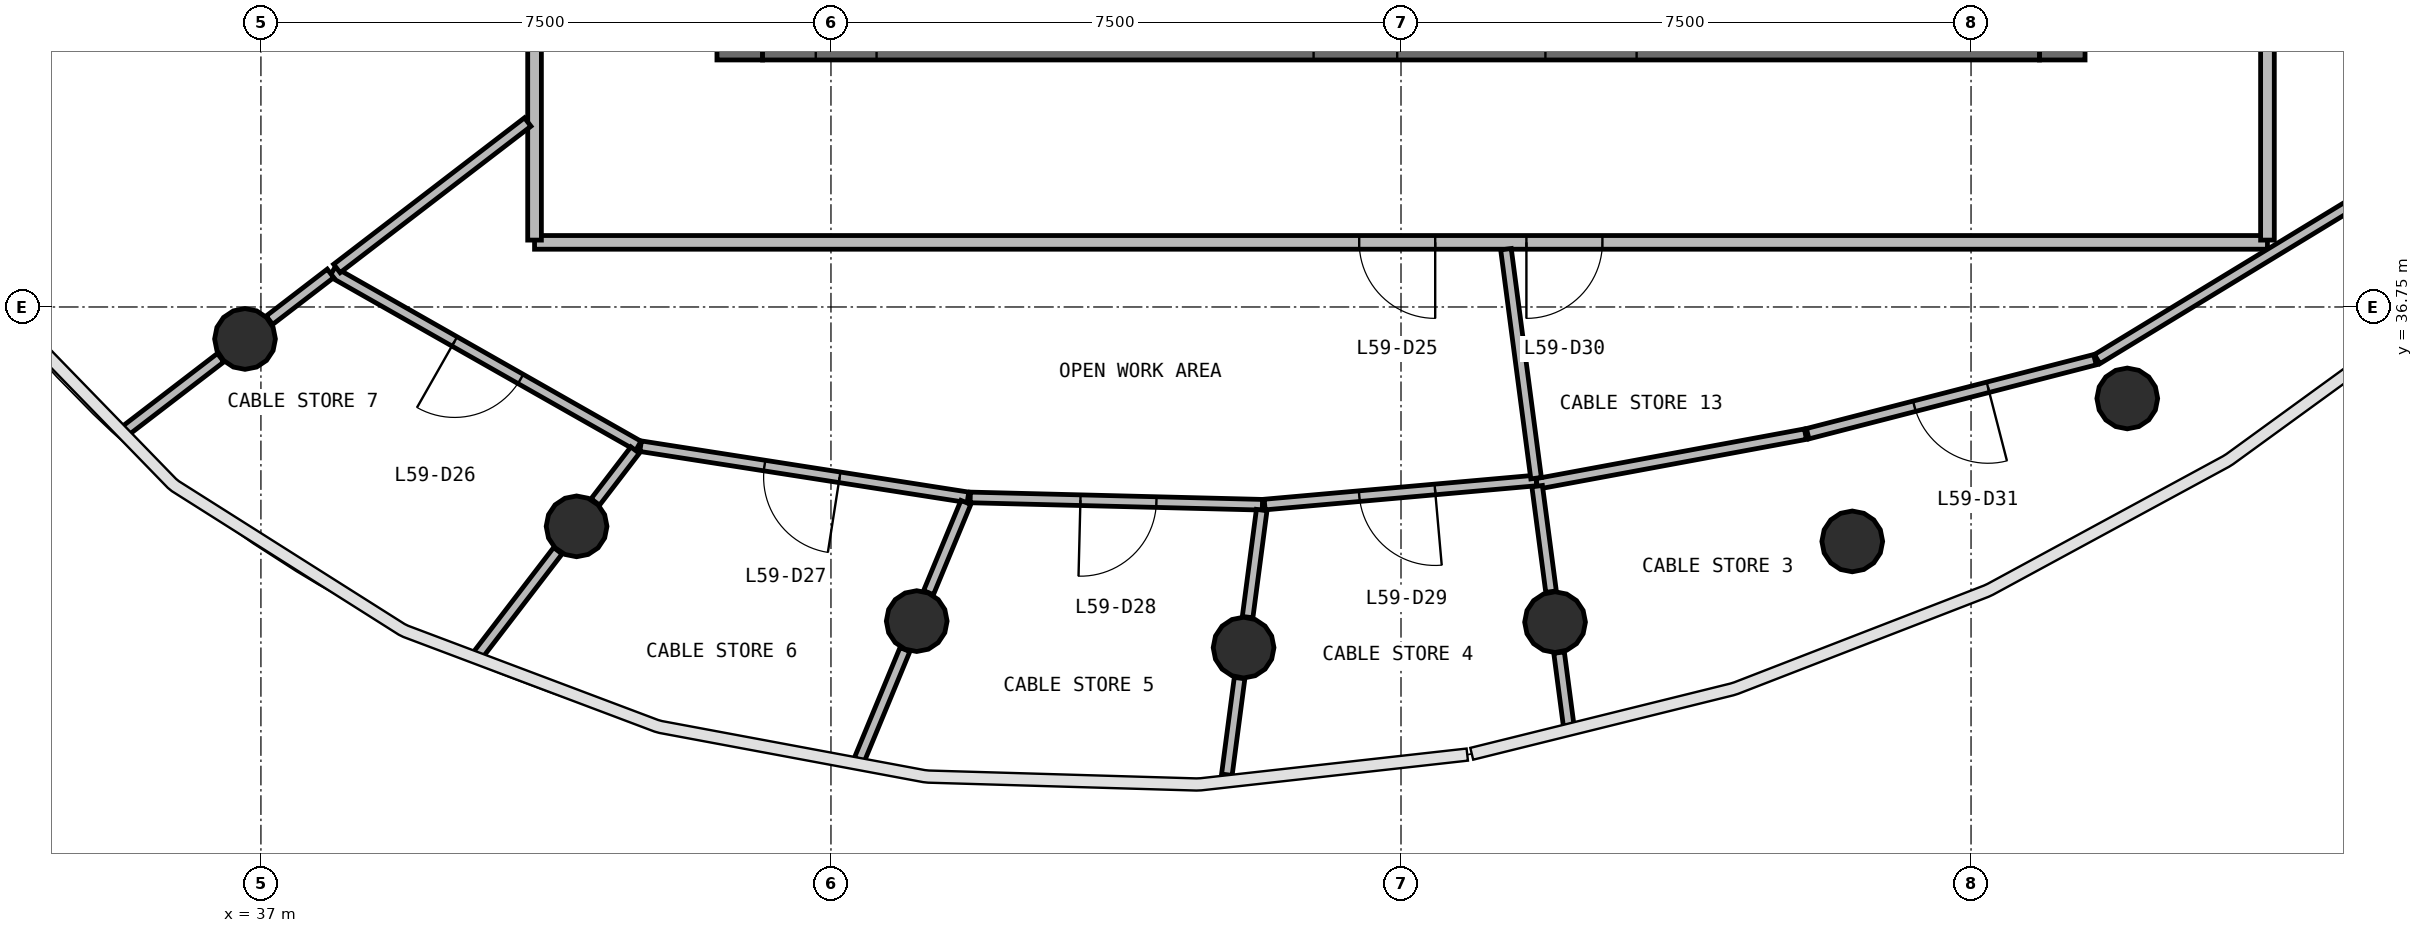
"""IFC4 building model, lengths in metres.
Left out: names, types, materials, properties, quantities, classifications, styles, units other than length and angle.
Written with IfcOpenShell. Run it as: python <this file> out.ifc"""

import sys

from ifc_helpers import new_model, si_unit, direction, frame, frame_2d, origin, origin_2d, place, context, subcontext, project, spatial, rectangle, circle, extrude, source, transform, mapped, element, fill, save


model = new_model("IFC4")
c1 = context("Model", 3, precision=1e-05, world=origin(), true_north=direction((0.0, 1.0)))
c2 = subcontext(c1, "Body", "Model", "MODEL_VIEW")
j1 = project(units=[si_unit("LENGTHUNIT", "METRE"), si_unit("PLANEANGLEUNIT", "RADIAN")], contexts=[c1])
p1 = place(None, origin())
s1 = spatial("IfcSite", under=j1, at=p1, CompositionType="ELEMENT")
p2 = place(p1, origin())
s2 = spatial("IfcBuilding", under=s1, at=p2, CompositionType="ELEMENT")
p3 = place(p2, frame((0.0, 0.0, 242.3)))
s3 = spatial("IfcBuildingStorey", under=s2, at=p3, CompositionType="ELEMENT", Elevation=242.3)
p4 = place(p3, frame((60.7, 40.0, 0.0), z_axis=(0.0, 0.0, 1.0), x_axis=(0.0, 1.0, 0.0)))
e1 = element("IfcWall", 1, at=p4, inside=s3, PredefinedType="SHEAR", context=c2, shape_type="SweptSolid", body=[
    extrude(rectangle(XDim=16.0, YDim=0.6, at=frame_2d((8.0, 0.0))), origin(), (0.0, 0.0, 1.0), 3.9),
])
p5 = place(p4, frame((7.1, 0.0, 0.0)))
e2 = element("IfcOpeningElement", 2, at=p5, cuts=e1, PredefinedType="OPENING", context=c2, shape_type="SweptSolid", body=[
    extrude(rectangle(XDim=1.8, YDim=2.1, at=frame_2d((0.9, 1.05))), frame((0.0, 0.31, 0.0), z_axis=(0.0, -1.0, 0.0), x_axis=(1.0, 0.0, 0.0)), (0.0, 0.0, 1.0), 0.62),
])
p6 = place(p3, frame((43.3, 56.0, 0.0), z_axis=(0.0, 0.0, 1.0), x_axis=(0.0, -1.0, 0.0)))
e3 = element("IfcWall", 3, at=p6, inside=s3, PredefinedType="SHEAR", context=c2, shape_type="SweptSolid", body=[
    extrude(rectangle(XDim=16.0, YDim=0.6, at=frame_2d((8.0, 0.0))), origin(), (0.0, 0.0, 1.0), 3.9),
])
p7 = place(p6, frame((7.1, 0.0, 0.0)))
e4 = element("IfcOpeningElement", 4, at=p7, cuts=e3, PredefinedType="OPENING", context=c2, shape_type="SweptSolid", body=[
    extrude(rectangle(XDim=1.8, YDim=2.1, at=frame_2d((0.9, 1.05))), frame((0.0, 0.31, 0.0), z_axis=(0.0, -1.0, 0.0), x_axis=(1.0, 0.0, 0.0)), (0.0, 0.0, 1.0), 0.62),
])
p8 = place(p3, frame((43.6, 40.3, 0.0), z_axis=(0.0, 0.0, 1.0), x_axis=(1.0, 0.0, 0.0)))
e5 = element("IfcWall", 5, at=p8, inside=s3, PredefinedType="SHEAR", context=c2, shape_type="SweptSolid", body=[
    extrude(rectangle(XDim=16.8, YDim=0.6, at=frame_2d((8.4, 0.0))), origin(), (0.0, 0.0, 1.0), 3.9),
])
p9 = place(p8, frame((10.3, 0.0, 0.0)))
e6 = element("IfcOpeningElement", 6, at=p9, cuts=e5, PredefinedType="OPENING", context=c2, shape_type="SweptSolid", body=[
    extrude(rectangle(XDim=1.2, YDim=2.1, at=frame_2d((0.6, 1.05))), frame((0.0, 0.31, 0.0), z_axis=(0.0, -1.0, 0.0), x_axis=(1.0, 0.0, 0.0)), (0.0, 0.0, 1.0), 0.62),
])
p10 = place(p8, frame((7.25, 0.0, 0.0)))
e7 = element("IfcOpeningElement", 7, at=p10, cuts=e5, PredefinedType="OPENING", context=c2, shape_type="SweptSolid", body=[
    extrude(rectangle(XDim=1.1, YDim=2.1, at=frame_2d((0.55, 1.05))), frame((0.0, 0.31, 0.0), z_axis=(0.0, -1.0, 0.0), x_axis=(1.0, 0.0, 0.0)), (0.0, 0.0, 1.0), 0.62),
])
p11 = place(p8, frame((0.7, 0.0, 0.0)))
e8 = element("IfcOpeningElement", 8, at=p11, cuts=e5, PredefinedType="OPENING", context=c2, shape_type="SweptSolid", body=[
    extrude(rectangle(XDim=0.8, YDim=2.1, at=frame_2d((0.4, 1.05))), frame((0.0, 0.31, 0.0), z_axis=(0.0, -1.0, 0.0), x_axis=(1.0, 0.0, 0.0)), (0.0, 0.0, 1.0), 0.62),
])
m1 = source(origin(), c2, "Body", "SweptSolid", [
    extrude(circle(Radius=0.4, at=origin_2d()), origin(), (0.0, 0.0, 1.0), 3.9),
])
for number, where, z_axis, x_axis in (
    (9, (36.791, 36.329, 0.0), (0.0, 0.0, 1.0), (1.0, 0.0, 0.0)),
    (10, (41.153, 33.864, 0.0), (0.0, 0.0, 1.0), (1.0, 0.0, 0.0)),
    (11, (45.628, 32.617, 0.0), (0.0, 0.0, 1.0), (1.0, 0.0, 0.0)),
    (12, (49.929, 32.269, 0.0), (0.0, 0.0, 1.0), (1.0, 0.0, 0.0)),
    (13, (54.027, 32.604, 0.0), (0.0, 0.0, 1.0), (1.0, 0.0, 0.0)),
    (14, (57.937, 33.666, 0.0), (0.0, 0.0, 1.0), (1.0, 0.0, 0.0)),
    (15, (61.556, 35.547, 0.0), (0.0, 0.0, 1.0), (1.0, 0.0, 0.0)),
):
    element("IfcColumn", number, at=place(p3, frame(where, z_axis=z_axis, x_axis=x_axis)), inside=s3, PredefinedType="COLUMN", context=c2, shape_type="MappedRepresentation", body=[
        mapped(m1, transform((0.0, 0.0, 0.0), scale=1.0)),
    ])
p12 = place(p3, frame((63.4, 37.6, 0.0), z_axis=(0.0, 0.0, 1.0), x_axis=(-1.0, 0.0, 0.0)))
e16 = element("IfcWall", 16, at=p12, inside=s3, PredefinedType="PARTITIONING", context=c2, shape_type="SweptSolid", body=[
    extrude(rectangle(XDim=22.8, YDim=0.18, at=frame_2d((11.4, 0.0))), origin(), (0.0, 0.0, 1.0), 2.88),
])
p13 = place(p12, frame((10.95, 0.0, 0.0)))
e17 = element("IfcOpeningElement", 17, at=p13, cuts=e16, PredefinedType="OPENING", context=c2, shape_type="SweptSolid", body=[
    extrude(rectangle(XDim=1.0, YDim=2.1, at=frame_2d((0.5, 1.05))), frame((0.0, 0.1, 0.0), z_axis=(0.0, -1.0, 0.0), x_axis=(1.0, 0.0, 0.0)), (0.0, 0.0, 1.0), 0.2),
])
p14 = place(p12, frame((8.75, 0.0, 0.0)))
e18 = element("IfcOpeningElement", 18, at=p14, cuts=e16, PredefinedType="OPENING", context=c2, shape_type="SweptSolid", body=[
    extrude(rectangle(XDim=1.0, YDim=2.1, at=frame_2d((0.5, 1.05))), frame((0.0, 0.1, 0.0), z_axis=(0.0, -1.0, 0.0), x_axis=(1.0, 0.0, 0.0)), (0.0, 0.0, 1.0), 0.2),
])
p15 = place(p3, frame((63.4, 58.37, 0.0), z_axis=(0.0, 0.0, 1.0), x_axis=(0.0, -1.0, 0.0)))
e19 = element("IfcWall", 19, at=p15, inside=s3, PredefinedType="PARTITIONING", context=c2, shape_type="SweptSolid", body=[
    extrude(rectangle(XDim=20.74, YDim=0.18, at=frame_2d((10.37, 0.0))), origin(), (0.0, 0.0, 1.0), 2.88),
])
p16 = place(p15, frame((9.89, 0.0, 0.0)))
e20 = element("IfcOpeningElement", 20, at=p16, cuts=e19, PredefinedType="OPENING", context=c2, shape_type="SweptSolid", body=[
    extrude(rectangle(XDim=1.0, YDim=2.1, at=frame_2d((0.5, 1.05))), frame((0.0, 0.1, 0.0), z_axis=(0.0, -1.0, 0.0), x_axis=(1.0, 0.0, 0.0)), (0.0, 0.0, 1.0), 0.2),
])
p17 = place(p15, frame((7.69, 0.0, 0.0)))
e21 = element("IfcOpeningElement", 21, at=p17, cuts=e19, PredefinedType="OPENING", context=c2, shape_type="SweptSolid", body=[
    extrude(rectangle(XDim=1.0, YDim=2.1, at=frame_2d((0.5, 1.05))), frame((0.0, 0.1, 0.0), z_axis=(0.0, -1.0, 0.0), x_axis=(1.0, 0.0, 0.0)), (0.0, 0.0, 1.0), 0.2),
])
p18 = place(p3, frame((40.6, 37.63, 0.0), z_axis=(0.0, 0.0, 1.0), x_axis=(0.0, 1.0, 0.0)))
e22 = element("IfcWall", 22, at=p18, inside=s3, PredefinedType="PARTITIONING", context=c2, shape_type="SweptSolid", body=[
    extrude(rectangle(XDim=20.74, YDim=0.18, at=frame_2d((10.37, 0.0))), origin(), (0.0, 0.0, 1.0), 2.88),
])
p19 = place(p18, frame((9.89, 0.0, 0.0)))
e23 = element("IfcOpeningElement", 23, at=p19, cuts=e22, PredefinedType="OPENING", context=c2, shape_type="SweptSolid", body=[
    extrude(rectangle(XDim=1.0, YDim=2.1, at=frame_2d((0.5, 1.05))), frame((0.0, 0.1, 0.0), z_axis=(0.0, -1.0, 0.0), x_axis=(1.0, 0.0, 0.0)), (0.0, 0.0, 1.0), 0.2),
])
p20 = place(p18, frame((7.69, 0.0, 0.0)))
e24 = element("IfcOpeningElement", 24, at=p20, cuts=e22, PredefinedType="OPENING", context=c2, shape_type="SweptSolid", body=[
    extrude(rectangle(XDim=1.0, YDim=2.1, at=frame_2d((0.5, 1.05))), frame((0.0, 0.1, 0.0), z_axis=(0.0, -1.0, 0.0), x_axis=(1.0, 0.0, 0.0)), (0.0, 0.0, 1.0), 0.2),
])
p21 = place(p3, frame((41.966, 34.923, 0.0), z_axis=(0.0, 0.0, 1.0), x_axis=(-0.869515217262, 0.493906151966, 0.0)))
e25 = element("IfcWall", 25, at=p21, inside=s3, PredefinedType="PARTITIONING", context=c2, shape_type="SweptSolid", body=[
    extrude(rectangle(XDim=4.631, YDim=0.14, at=frame_2d((2.315, 0.0))), origin(), (0.0, 0.0, 1.0), 2.88),
])
p22 = place(p21, frame((1.781, 0.0, 0.0)))
e26 = element("IfcOpeningElement", 26, at=p22, cuts=e25, PredefinedType="OPENING", context=c2, shape_type="SweptSolid", body=[
    extrude(rectangle(XDim=1.0, YDim=2.1, at=frame_2d((0.5, 1.05))), frame((0.0, 0.08, 0.0), z_axis=(0.0, -1.0, 0.0), x_axis=(1.0, 0.0, 0.0)), (0.0, 0.0, 1.0), 0.16),
])
p23 = place(p3, frame((46.302, 34.245, 0.0), z_axis=(0.0, 0.0, 1.0), x_axis=(-0.987998415533, 0.15446401168, 0.0)))
e27 = element("IfcWall", 27, at=p23, inside=s3, PredefinedType="PARTITIONING", context=c2, shape_type="SweptSolid", body=[
    extrude(rectangle(XDim=4.359, YDim=0.14, at=frame_2d((2.18, 0.0))), origin(), (0.0, 0.0, 1.0), 2.88),
])
p24 = place(p23, frame((1.709, 0.0, 0.0)))
e28 = element("IfcOpeningElement", 28, at=p24, cuts=e27, PredefinedType="OPENING", context=c2, shape_type="SweptSolid", body=[
    extrude(rectangle(XDim=1.0, YDim=2.1, at=frame_2d((0.5, 1.05))), frame((0.0, 0.08, 0.0), z_axis=(0.0, -1.0, 0.0), x_axis=(1.0, 0.0, 0.0)), (0.0, 0.0, 1.0), 0.16),
])
p25 = place(p3, frame((61.159, 36.064, 0.0), z_axis=(0.0, 0.0, 1.0), x_axis=(0.854311228383, 0.519761796459, 0.0)))
e29 = element("IfcWall", 29, at=p25, inside=s3, PredefinedType="PARTITIONING", context=c2, shape_type="SweptSolid", body=[
    extrude(rectangle(XDim=3.974, YDim=0.14, at=frame_2d((1.987, 0.0))), origin(), (0.0, 0.0, 1.0), 2.88),
])
p26 = place(p3, frame((61.13, 36.056, 0.0), z_axis=(0.0, 0.0, 1.0), x_axis=(-0.968365634835, -0.249535563137, 0.0)))
e30 = element("IfcWall", 30, at=p26, inside=s3, PredefinedType="PARTITIONING", context=c2, shape_type="SweptSolid", body=[
    extrude(rectangle(XDim=3.903, YDim=0.14, at=frame_2d((1.951, 0.0))), origin(), (0.0, 0.0, 1.0), 2.88),
])
p27 = place(p26, frame((1.453, 0.0, 0.0)))
e31 = element("IfcOpeningElement", 31, at=p27, cuts=e30, PredefinedType="OPENING", context=c2, shape_type="SweptSolid", body=[
    extrude(rectangle(XDim=1.0, YDim=2.1, at=frame_2d((0.5, 1.05))), frame((0.0, 0.08, 0.0), z_axis=(0.0, -1.0, 0.0), x_axis=(1.0, 0.0, 0.0)), (0.0, 0.0, 1.0), 0.16),
])
p28 = place(p3, frame((50.177, 34.148, 0.0), z_axis=(0.0, 0.0, 1.0), x_axis=(-0.999687051256, 0.025015985913, 0.0)))
e32 = element("IfcWall", 32, at=p28, inside=s3, PredefinedType="PARTITIONING", context=c2, shape_type="SweptSolid", body=[
    extrude(rectangle(XDim=3.845, YDim=0.14, at=frame_2d((1.923, 0.0))), origin(), (0.0, 0.0, 1.0), 2.88),
])
p29 = place(p28, frame((1.395, 0.0, 0.0)))
e33 = element("IfcOpeningElement", 33, at=p29, cuts=e32, PredefinedType="OPENING", context=c2, shape_type="SweptSolid", body=[
    extrude(rectangle(XDim=1.0, YDim=2.1, at=frame_2d((0.5, 1.05))), frame((0.0, 0.08, 0.0), z_axis=(0.0, -1.0, 0.0), x_axis=(1.0, 0.0, 0.0)), (0.0, 0.0, 1.0), 0.16),
])
p30 = place(p3, frame((53.788, 34.423, 0.0), z_axis=(0.0, 0.0, 1.0), x_axis=(0.983272092094, 0.182142781656, 0.0)))
e34 = element("IfcWall", 34, at=p30, inside=s3, PredefinedType="PARTITIONING", context=c2, shape_type="SweptSolid", body=[
    extrude(rectangle(XDim=3.594, YDim=0.14, at=frame_2d((1.797, 0.0))), origin(), (0.0, 0.0, 1.0), 2.88),
])
p31 = place(p3, frame((53.779, 34.468, 0.0), z_axis=(0.0, 0.0, 1.0), x_axis=(-0.99609594944, -0.088277174337, 0.0)))
e35 = element("IfcWall", 35, at=p31, inside=s3, PredefinedType="PARTITIONING", context=c2, shape_type="SweptSolid", body=[
    extrude(rectangle(XDim=3.587, YDim=0.14, at=frame_2d((1.793, 0.0))), origin(), (0.0, 0.0, 1.0), 2.88),
])
p32 = place(p31, frame((1.337, 0.0, 0.0)))
e36 = element("IfcOpeningElement", 36, at=p32, cuts=e35, PredefinedType="OPENING", context=c2, shape_type="SweptSolid", body=[
    extrude(rectangle(XDim=1.0, YDim=2.1, at=frame_2d((0.5, 1.05))), frame((0.0, 0.08, 0.0), z_axis=(0.0, -1.0, 0.0), x_axis=(1.0, 0.0, 0.0)), (0.0, 0.0, 1.0), 0.16),
])
p33 = place(p3, frame((40.51, 39.183, 0.0), z_axis=(0.0, 0.0, 1.0), x_axis=(-0.793360447036, -0.608752167207, 0.0)))
e37 = element("IfcWall", 37, at=p33, inside=s3, PredefinedType="PARTITIONING", context=c2, shape_type="SweptSolid", body=[
    extrude(rectangle(XDim=3.165, YDim=0.14, at=frame_2d((1.583, 0.0))), origin(), (0.0, 0.0, 1.0), 2.88),
])
p34 = place(p3, frame((53.381, 37.51, 0.0), z_axis=(0.0, 0.0, 1.0), x_axis=(0.130489847189, -0.99144964561, 0.0)))
e38 = element("IfcWall", 38, at=p34, inside=s3, PredefinedType="PARTITIONING", context=c2, shape_type="SweptSolid", body=[
    extrude(rectangle(XDim=3.038, YDim=0.14, at=frame_2d((1.519, 0.0))), origin(), (0.0, 0.0, 1.0), 2.88),
])
p35 = place(p3, frame((40.907, 33.543, 0.0), z_axis=(0.0, 0.0, 1.0), x_axis=(-0.608647541693, -0.793440716116, 0.0)))
e39 = element("IfcWall", 39, at=p35, inside=s3, PredefinedType="PARTITIONING", context=c2, shape_type="SweptSolid", body=[
    extrude(rectangle(XDim=1.732, YDim=0.14, at=frame_2d((0.866, 0.0))), origin(), (0.0, 0.0, 1.0), 2.88),
])
p36 = place(p3, frame((36.469, 36.083, 0.0), z_axis=(0.0, 0.0, 1.0), x_axis=(-0.793355628453, -0.608758447006, 0.0)))
e40 = element("IfcWall", 40, at=p36, inside=s3, PredefinedType="PARTITIONING", context=c2, shape_type="SweptSolid", body=[
    extrude(rectangle(XDim=1.599, YDim=0.14, at=frame_2d((0.799, 0.0))), origin(), (0.0, 0.0, 1.0), 2.88),
])
p37 = place(p3, frame((45.473, 32.243, 0.0), z_axis=(0.0, 0.0, 1.0), x_axis=(-0.382736533707, -0.923857535427, 0.0)))
e41 = element("IfcWall", 41, at=p37, inside=s3, PredefinedType="PARTITIONING", context=c2, shape_type="SweptSolid", body=[
    extrude(rectangle(XDim=1.569, YDim=0.14, at=frame_2d((0.785, 0.0))), origin(), (0.0, 0.0, 1.0), 2.88),
])
p38 = place(p3, frame((50.167, 34.078, 0.0), z_axis=(0.0, 0.0, 1.0), x_axis=(-0.130610105032, -0.99143381043, 0.0)))
e42 = element("IfcWall", 42, at=p38, inside=s3, PredefinedType="PARTITIONING", context=c2, shape_type="SweptSolid", body=[
    extrude(rectangle(XDim=1.421, YDim=0.14, at=frame_2d((0.71, 0.0))), origin(), (0.0, 0.0, 1.0), 2.88),
])
p39 = place(p3, frame((53.792, 34.393, 0.0), z_axis=(0.0, 0.0, 1.0), x_axis=(0.130450001243, -0.991454889128, 0.0)))
e43 = element("IfcWall", 43, at=p39, inside=s3, PredefinedType="PARTITIONING", context=c2, shape_type="SweptSolid", body=[
    extrude(rectangle(XDim=1.4, YDim=0.14, at=frame_2d((0.7, 0.0))), origin(), (0.0, 0.0, 1.0), 2.88),
])
p40 = place(p3, frame((46.275, 34.179, 0.0), z_axis=(0.0, 0.0, 1.0), x_axis=(-0.382698623129, -0.923873240145, 0.0)))
e44 = element("IfcWall", 44, at=p40, inside=s3, PredefinedType="PARTITIONING", context=c2, shape_type="SweptSolid", body=[
    extrude(rectangle(XDim=1.285, YDim=0.14, at=frame_2d((0.643, 0.0))), origin(), (0.0, 0.0, 1.0), 2.88),
])
p41 = place(p3, frame((49.876, 31.868, 0.0), z_axis=(0.0, 0.0, 1.0), x_axis=(-0.130617047537, -0.991432895809, 0.0)))
e45 = element("IfcWall", 45, at=p41, inside=s3, PredefinedType="PARTITIONING", context=c2, shape_type="SweptSolid", body=[
    extrude(rectangle(XDim=1.282, YDim=0.14, at=frame_2d((0.641, 0.0))), origin(), (0.0, 0.0, 1.0), 2.88),
])
p42 = place(p3, frame((37.915, 37.192, 0.0), z_axis=(0.0, 0.0, 1.0), x_axis=(-0.793358047676, -0.608755294177, 0.0)))
e46 = element("IfcWall", 46, at=p42, inside=s3, PredefinedType="PARTITIONING", context=c2, shape_type="SweptSolid", body=[
    extrude(rectangle(XDim=1.013, YDim=0.14, at=frame_2d((0.506, 0.0))), origin(), (0.0, 0.0, 1.0), 2.88),
])
p43 = place(p3, frame((54.08, 32.203, 0.0), z_axis=(0.0, 0.0, 1.0), x_axis=(0.130657168986, -0.991427609154, 0.0)))
e47 = element("IfcWall", 47, at=p43, inside=s3, PredefinedType="PARTITIONING", context=c2, shape_type="SweptSolid", body=[
    extrude(rectangle(XDim=0.966, YDim=0.14, at=frame_2d((0.483, 0.0))), origin(), (0.0, 0.0, 1.0), 2.88),
])
p44 = place(p3, frame((41.923, 34.867, 0.0), z_axis=(0.0, 0.0, 1.0), x_axis=(-0.608777226721, -0.793341218031, 0.0)))
e48 = element("IfcWall", 48, at=p44, inside=s3, PredefinedType="PARTITIONING", context=c2, shape_type="SweptSolid", body=[
    extrude(rectangle(XDim=0.86, YDim=0.14, at=frame_2d((0.43, 0.0))), origin(), (0.0, 0.0, 1.0), 2.88),
])
m2 = source(origin(), c2, "Body", "SweptSolid", [
    extrude(rectangle(XDim=1.0, YDim=2.1, at=frame_2d((0.5, 1.05))), frame((0.0, 0.025, 0.0), z_axis=(0.0, -1.0, 0.0), x_axis=(1.0, 0.0, 0.0)), (0.0, 0.0, 1.0), 0.05),
])
p45 = place(p13, origin())
e49 = element("IfcDoor", 49, at=p45, inside=s3, OperationType="SINGLE_SWING_LEFT", PredefinedType="DOOR", context=c2, shape_type="MappedRepresentation", body=[
    mapped(m2, transform((0.0, 0.0, 0.0), scale=1.0)),
])
fill(e17, e49)
p46 = place(p22, origin())
e50 = element("IfcDoor", 50, at=p46, inside=s3, OperationType="SINGLE_SWING_RIGHT", PredefinedType="DOOR", context=c2, shape_type="MappedRepresentation", body=[
    mapped(m2, transform((0.0, 0.0, 0.0), scale=1.0)),
])
fill(e26, e50)
p47 = place(p24, origin())
e51 = element("IfcDoor", 51, at=p47, inside=s3, OperationType="SINGLE_SWING_LEFT", PredefinedType="DOOR", context=c2, shape_type="MappedRepresentation", body=[
    mapped(m2, transform((0.0, 0.0, 0.0), scale=1.0)),
])
fill(e28, e51)
p48 = place(p29, origin())
e52 = element("IfcDoor", 52, at=p48, inside=s3, OperationType="SINGLE_SWING_RIGHT", PredefinedType="DOOR", context=c2, shape_type="MappedRepresentation", body=[
    mapped(m2, transform((0.0, 0.0, 0.0), scale=1.0)),
])
fill(e33, e52)
p49 = place(p32, origin())
e53 = element("IfcDoor", 53, at=p49, inside=s3, OperationType="SINGLE_SWING_LEFT", PredefinedType="DOOR", context=c2, shape_type="MappedRepresentation", body=[
    mapped(m2, transform((0.0, 0.0, 0.0), scale=1.0)),
])
fill(e36, e53)
p50 = place(p14, origin())
e54 = element("IfcDoor", 54, at=p50, inside=s3, OperationType="SINGLE_SWING_RIGHT", PredefinedType="DOOR", context=c2, shape_type="MappedRepresentation", body=[
    mapped(m2, transform((0.0, 0.0, 0.0), scale=1.0)),
])
fill(e18, e54)
p51 = place(p27, origin())
e55 = element("IfcDoor", 55, at=p51, inside=s3, OperationType="SINGLE_SWING_LEFT", PredefinedType="DOOR", context=c2, shape_type="MappedRepresentation", body=[
    mapped(m2, transform((0.0, 0.0, 0.0), scale=1.0)),
])
fill(e31, e55)
save(model, sys.argv[1])
